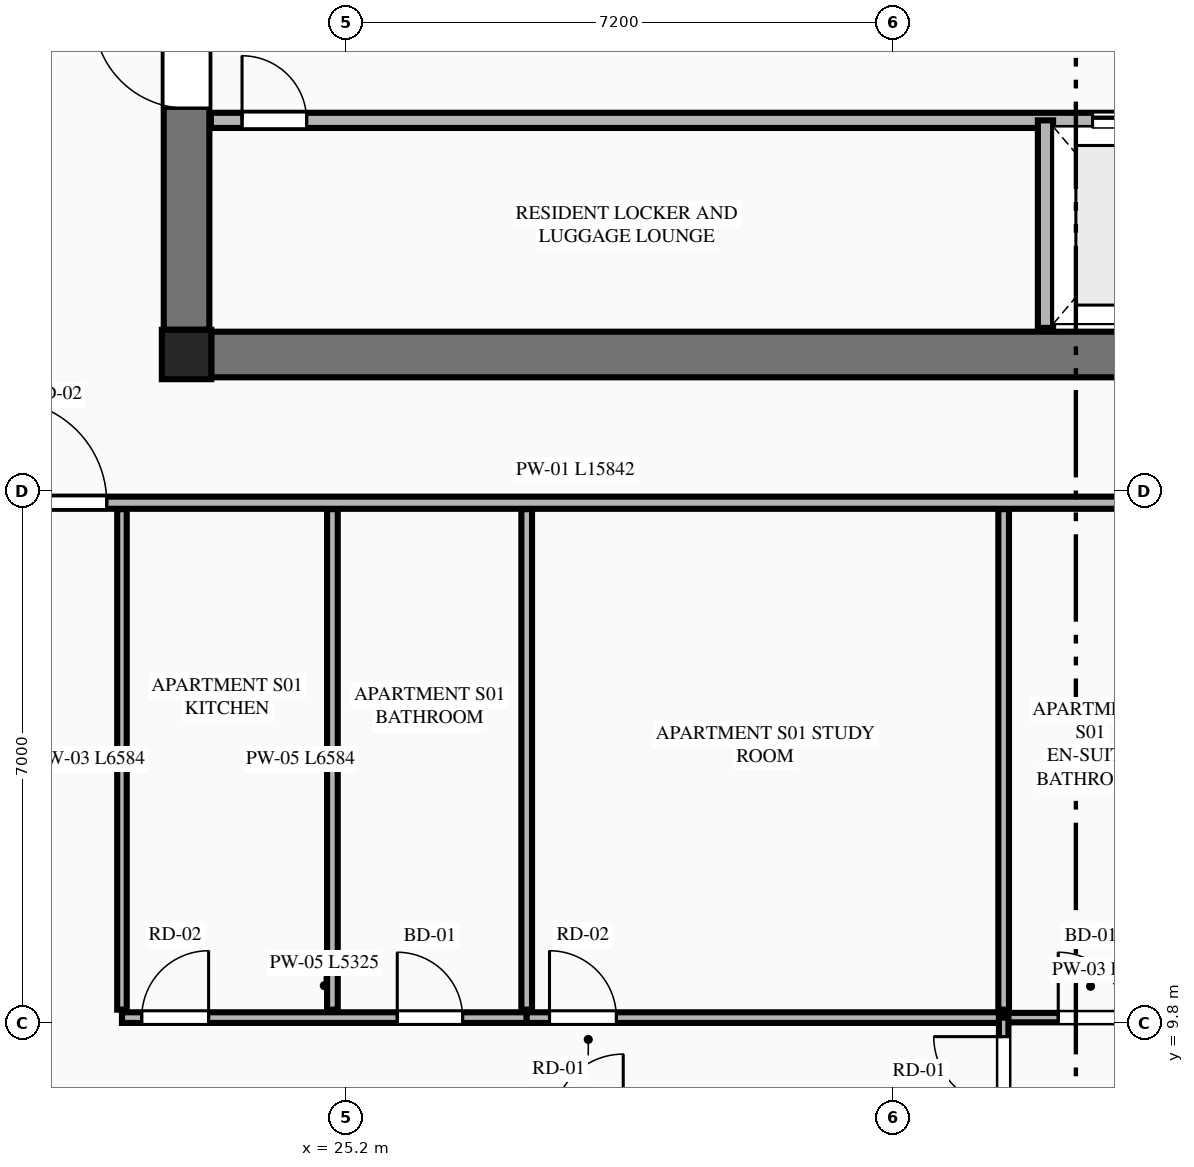
"""IFC4 building model, lengths in metres.
Left out: names, types, materials, properties, quantities, classifications, styles, units other than length and angle.
Written with IfcOpenShell. Run it as: python <this file> out.ifc"""

import sys

from ifc_helpers import new_model, si_unit, direction, frame, frame_2d, origin, origin_2d, place, context, subcontext, project, spatial, rectangle, extrude, element, fill, save


model = new_model("IFC4")
c1 = context("Model", 3, precision=1e-05, world=origin(), true_north=direction((0.0, 1.0)))
c2 = subcontext(c1, "Body", "Model", "MODEL_VIEW")
j1 = project(units=[si_unit("LENGTHUNIT", "METRE"), si_unit("PLANEANGLEUNIT", "RADIAN")], contexts=[c1])
p1 = place(None, origin())
s1 = spatial("IfcSite", under=j1, at=p1, CompositionType="ELEMENT")
p2 = place(p1, origin())
s2 = spatial("IfcBuilding", under=s1, at=p2, CompositionType="ELEMENT")
p3 = place(p2, frame((0.0, 0.0, 157.05)))
s3 = spatial("IfcBuildingStorey", under=s2, at=p3, CompositionType="ELEMENT", Elevation=157.05)
p4 = place(p3, frame((23.1, 18.6, 0.0), z_axis=(0.0, 0.0, 1.0), x_axis=(1.0, 0.0, 0.0)))
e1 = element("IfcColumn", 1, at=p4, inside=s3, PredefinedType="COLUMN", context=c2, shape_type="SweptSolid", body=[
    extrude(rectangle(XDim=0.65, YDim=0.65, at=origin_2d()), origin(), (0.0, 0.0, 1.0), 3.55),
])
p5 = place(p3, frame((23.425, 18.6, 0.0), z_axis=(0.0, 0.0, 1.0), x_axis=(1.0, 0.0, 0.0)))
e2 = element("IfcWall", 2, at=p5, inside=s3, PredefinedType="SHEAR", context=c2, shape_type="SweptSolid", body=[
    extrude(rectangle(XDim=17.95, YDim=0.6, at=frame_2d((8.975, 0.0))), origin(), (0.0, 0.0, 1.0), 3.34),
])
p6 = place(p3, frame((23.1, 18.925, 0.0), z_axis=(0.0, 0.0, 1.0), x_axis=(0.0, 1.0, 0.0)))
e3 = element("IfcWall", 3, at=p6, inside=s3, PredefinedType="SHEAR", context=c2, shape_type="SweptSolid", body=[
    extrude(rectangle(XDim=13.95, YDim=0.6, at=frame_2d((6.975, 0.0))), origin(), (0.0, 0.0, 1.0), 3.34),
])
p7 = place(p6, frame((2.915, 0.0, 0.0)))
e4 = element("IfcOpeningElement", 4, at=p7, cuts=e3, PredefinedType="OPENING", context=c2, shape_type="SweptSolid", body=[
    extrude(rectangle(XDim=1.22, YDim=2.25, at=frame_2d((0.61, 1.125))), frame((0.0, 0.31, 0.0), z_axis=(0.0, -1.0, 0.0), x_axis=(1.0, 0.0, 0.0)), (0.0, 0.0, 1.0), 0.62),
])
p8 = place(p3, frame((23.42, 21.68, 0.0), z_axis=(0.0, 0.0, 1.0), x_axis=(1.0, 0.0, 0.0)))
e5 = element("IfcWall", 5, at=p8, inside=s3, PredefinedType="PLUMBINGWALL", context=c2, shape_type="SweptSolid", body=[
    extrude(rectangle(XDim=17.96, YDim=0.2, at=frame_2d((8.98, 0.0))), origin(), (0.0, 0.0, 1.0), 3.34),
])
p9 = place(p8, frame((11.6, 0.0, 0.0)))
e6 = element("IfcOpeningElement", 6, at=p9, cuts=e5, PredefinedType="OPENING", context=c2, shape_type="SweptSolid", body=[
    extrude(rectangle(XDim=1.1, YDim=2.2, at=frame_2d((0.55, 1.1))), frame((0.0, 0.11, 0.0), z_axis=(0.0, -1.0, 0.0), x_axis=(1.0, 0.0, 0.0)), (0.0, 0.0, 1.0), 0.22),
])
p10 = place(p8, frame((0.41, 0.0, 0.0)))
e7 = element("IfcOpeningElement", 7, at=p10, cuts=e5, PredefinedType="OPENING", context=c2, shape_type="SweptSolid", body=[
    extrude(rectangle(XDim=0.85, YDim=2.05, at=frame_2d((0.425, 1.025))), frame((0.0, 0.11, 0.0), z_axis=(0.0, -1.0, 0.0), x_axis=(1.0, 0.0, 0.0)), (0.0, 0.0, 1.0), 0.22),
])
p11 = place(p8, frame((13.78, 0.0, 0.0)))
e8 = element("IfcOpeningElement", 8, at=p11, cuts=e5, PredefinedType="OPENING", context=c2, shape_type="SweptSolid", body=[
    extrude(rectangle(XDim=0.85, YDim=2.05, at=frame_2d((0.425, 1.025))), frame((0.0, 0.11, 0.0), z_axis=(0.0, -1.0, 0.0), x_axis=(1.0, 0.0, 0.0)), (0.0, 0.0, 1.0), 0.22),
])
p12 = place(p8, frame((16.13, 0.0, 0.0)))
e9 = element("IfcOpeningElement", 9, at=p12, cuts=e5, PredefinedType="OPENING", context=c2, shape_type="SweptSolid", body=[
    extrude(rectangle(XDim=0.85, YDim=2.05, at=frame_2d((0.425, 1.025))), frame((0.0, 0.11, 0.0), z_axis=(0.0, -1.0, 0.0), x_axis=(1.0, 0.0, 0.0)), (0.0, 0.0, 1.0), 0.22),
])
p13 = place(p3, frame((34.4, 18.95, 0.0), z_axis=(0.0, 0.0, 1.0), x_axis=(0.0, 1.0, 0.0)))
e10 = element("IfcWall", 10, at=p13, inside=s3, PredefinedType="PLUMBINGWALL", context=c2, shape_type="SweptSolid", body=[
    extrude(rectangle(XDim=2.73, YDim=0.2, at=frame_2d((1.365, 0.0))), origin(), (0.0, 0.0, 1.0), 3.34),
])
p14 = place(p3, frame((20.295, 16.65, 0.0), z_axis=(0.0, 0.0, 1.0), x_axis=(1.0, 0.0, 0.0)))
e11 = element("IfcWall", 11, at=p14, inside=s3, PredefinedType="PARTITIONING", context=c2, shape_type="SweptSolid", body=[
    extrude(rectangle(XDim=15.842, YDim=0.16, at=frame_2d((7.921, 0.0))), origin(), (0.0, 0.0, 1.0), 3.34),
])
p15 = place(p14, frame((0.405, 0.0, 0.0)))
e12 = element("IfcOpeningElement", 12, at=p15, cuts=e11, PredefinedType="OPENING", context=c2, shape_type="SweptSolid", body=[
    extrude(rectangle(XDim=1.35, YDim=2.35, at=frame_2d((0.675, 1.175))), frame((0.0, 0.09, 0.0), z_axis=(0.0, -1.0, 0.0), x_axis=(1.0, 0.0, 0.0)), (0.0, 0.0, 1.0), 0.18),
])
p16 = place(p3, frame((22.25, 9.981, 0.0), z_axis=(0.0, 0.0, 1.0), x_axis=(0.0, 1.0, 0.0)))
e13 = element("IfcWall", 13, at=p16, inside=s3, PredefinedType="PARTITIONING", context=c2, shape_type="SweptSolid", body=[
    extrude(rectangle(XDim=6.584, YDim=0.125, at=frame_2d((3.292, 0.0))), origin(), (0.0, 0.0, 1.0), 2.722),
])
p17 = place(p3, frame((22.25, 9.876, 0.0), z_axis=(0.0, 0.0, 1.0), x_axis=(1.0, 0.0, 0.0)))
e14 = element("IfcWall", 14, at=p17, inside=s3, PredefinedType="PLUMBINGWALL", context=c2, shape_type="SweptSolid", body=[
    extrude(rectangle(XDim=5.325, YDim=0.14, at=frame_2d((2.663, 0.0))), origin(), (0.0, 0.0, 1.0), 3.34),
])
p18 = place(p17, frame((3.622, 0.0, 0.0)))
e15 = element("IfcOpeningElement", 15, at=p18, cuts=e14, PredefinedType="OPENING", context=c2, shape_type="SweptSolid", body=[
    extrude(rectangle(XDim=0.86, YDim=2.1, at=frame_2d((0.43, 1.05))), frame((0.0, 0.08, 0.0), z_axis=(0.0, -1.0, 0.0), x_axis=(1.0, 0.0, 0.0)), (0.0, 0.0, 1.0), 0.16),
])
p19 = place(p17, frame((0.26, 0.0, 0.0)))
e16 = element("IfcOpeningElement", 16, at=p19, cuts=e14, PredefinedType="OPENING", context=c2, shape_type="SweptSolid", body=[
    extrude(rectangle(XDim=0.88, YDim=2.15, at=frame_2d((0.44, 1.075))), frame((0.0, 0.08, 0.0), z_axis=(0.0, -1.0, 0.0), x_axis=(1.0, 0.0, 0.0)), (0.0, 0.0, 1.0), 0.16),
])
p20 = place(p3, frame((27.575, 9.876, 0.0), z_axis=(0.0, 0.0, 1.0), x_axis=(1.0, 0.0, 0.0)))
e17 = element("IfcWall", 17, at=p20, inside=s3, PredefinedType="PLUMBINGWALL", context=c2, shape_type="SweptSolid", body=[
    extrude(rectangle(XDim=6.275, YDim=0.14, at=frame_2d((3.138, 0.0))), origin(), (0.0, 0.0, 1.0), 3.34),
])
p21 = place(p20, frame((0.3, 0.0, 0.0)))
e18 = element("IfcOpeningElement", 18, at=p21, cuts=e17, PredefinedType="OPENING", context=c2, shape_type="SweptSolid", body=[
    extrude(rectangle(XDim=0.88, YDim=2.15, at=frame_2d((0.44, 1.075))), frame((0.0, 0.08, 0.0), z_axis=(0.0, -1.0, 0.0), x_axis=(1.0, 0.0, 0.0)), (0.0, 0.0, 1.0), 0.16),
])
p22 = place(p3, frame((33.85, 9.876, 0.0), z_axis=(0.0, 0.0, 1.0), x_axis=(1.0, 0.0, 0.0)))
e19 = element("IfcWall", 19, at=p22, inside=s3, PredefinedType="PARTITIONING", context=c2, shape_type="SweptSolid", body=[
    extrude(rectangle(XDim=2.287, YDim=0.125, at=frame_2d((1.144, 0.0))), origin(), (0.0, 0.0, 1.0), 3.34),
])
p23 = place(p22, frame((0.718, 0.0, 0.0)))
e20 = element("IfcOpeningElement", 20, at=p23, cuts=e19, PredefinedType="OPENING", context=c2, shape_type="SweptSolid", body=[
    extrude(rectangle(XDim=0.86, YDim=2.1, at=frame_2d((0.43, 1.05))), frame((0.0, 0.073, 0.0), z_axis=(0.0, -1.0, 0.0), x_axis=(1.0, 0.0, 0.0)), (0.0, 0.0, 1.0), 0.145),
])
p24 = place(p3, frame((25.019, 9.981, 0.0), z_axis=(0.0, 0.0, 1.0), x_axis=(0.0, 1.0, 0.0)))
e21 = element("IfcWall", 21, at=p24, inside=s3, PredefinedType="PLUMBINGWALL", context=c2, shape_type="SweptSolid", body=[
    extrude(rectangle(XDim=6.584, YDim=0.14, at=frame_2d((3.292, 0.0))), origin(), (0.0, 0.0, 1.0), 3.34),
])
p25 = place(p3, frame((33.85, 8.546, 0.0), z_axis=(0.0, 0.0, 1.0), x_axis=(0.0, 1.0, 0.0)))
e22 = element("IfcWall", 22, at=p25, inside=s3, PredefinedType="PARTITIONING", context=c2, shape_type="SweptSolid", body=[
    extrude(rectangle(XDim=1.33, YDim=0.125, at=frame_2d((0.665, 0.0))), origin(), (0.0, 0.0, 1.0), 3.34),
])
p26 = place(p25, frame((0.16, 0.0, 0.0)))
e23 = element("IfcOpeningElement", 23, at=p26, cuts=e22, PredefinedType="OPENING", context=c2, shape_type="SweptSolid", body=[
    extrude(rectangle(XDim=0.92, YDim=2.15, at=frame_2d((0.46, 1.075))), frame((0.0, 0.073, 0.0), z_axis=(0.0, -1.0, 0.0), x_axis=(1.0, 0.0, 0.0)), (0.0, 0.0, 1.0), 0.145),
])
for number, where, z_axis, x_axis in (
    (24, (27.575, 9.981, 0.0), (0.0, 0.0, 1.0), (0.0, 1.0, 0.0)),
    (25, (33.85, 9.981, 0.0), (0.0, 0.0, 1.0), (0.0, 1.0, 0.0)),
):
    element("IfcWall", number, at=place(p3, frame(where, z_axis=z_axis, x_axis=x_axis)), inside=s3, PredefinedType="PLUMBINGWALL", context=c2, shape_type="SweptSolid", body=[
        extrude(rectangle(XDim=6.584, YDim=0.14, at=frame_2d((3.292, 0.0))), origin(), (0.0, 0.0, 1.0), 3.34),
    ])
p27 = place(p7, origin())
e26 = element("IfcDoor", 26, at=p27, inside=s3, OperationType="SINGLE_SWING_RIGHT", PredefinedType="DOOR", context=c2, shape_type="SweptSolid", body=[
    extrude(rectangle(XDim=1.22, YDim=2.25, at=frame_2d((0.61, 1.125))), frame((0.0, 0.025, 0.0), z_axis=(0.0, -1.0, 0.0), x_axis=(1.0, 0.0, 0.0)), (0.0, 0.0, 1.0), 0.05),
])
fill(e4, e26)
p28 = place(p9, origin())
e27 = element("IfcDoor", 27, at=p28, inside=s3, OperationType="DOUBLE_DOOR_SLIDING", PredefinedType="DOOR", context=c2, shape_type="SweptSolid", body=[
    extrude(rectangle(XDim=1.1, YDim=2.2, at=frame_2d((0.55, 1.1))), frame((0.0, 0.025, 0.0), z_axis=(0.0, -1.0, 0.0), x_axis=(1.0, 0.0, 0.0)), (0.0, 0.0, 1.0), 0.05),
])
fill(e6, e27)
p29 = place(p10, origin())
e28 = element("IfcDoor", 28, at=p29, inside=s3, OperationType="SINGLE_SWING_LEFT", PredefinedType="DOOR", context=c2, shape_type="SweptSolid", body=[
    extrude(rectangle(XDim=0.85, YDim=2.05, at=frame_2d((0.425, 1.025))), frame((0.0, 0.025, 0.0), z_axis=(0.0, -1.0, 0.0), x_axis=(1.0, 0.0, 0.0)), (0.0, 0.0, 1.0), 0.05),
])
fill(e7, e28)
p30 = place(p18, origin())
e29 = element("IfcDoor", 29, at=p30, inside=s3, OperationType="SINGLE_SWING_LEFT", PredefinedType="DOOR", context=c2, shape_type="SweptSolid", body=[
    extrude(rectangle(XDim=0.86, YDim=2.1, at=frame_2d((0.43, 1.05))), frame((0.0, 0.025, 0.0), z_axis=(0.0, -1.0, 0.0), x_axis=(1.0, 0.0, 0.0)), (0.0, 0.0, 1.0), 0.05),
])
fill(e15, e29)
p31 = place(p23, origin())
e30 = element("IfcDoor", 30, at=p31, inside=s3, OperationType="SINGLE_SWING_LEFT", PredefinedType="DOOR", context=c2, shape_type="SweptSolid", body=[
    extrude(rectangle(XDim=0.86, YDim=2.1, at=frame_2d((0.43, 1.05))), frame((0.0, 0.025, 0.0), z_axis=(0.0, -1.0, 0.0), x_axis=(1.0, 0.0, 0.0)), (0.0, 0.0, 1.0), 0.05),
])
fill(e20, e30)
p32 = place(p15, origin())
e31 = element("IfcDoor", 31, at=p32, inside=s3, OperationType="SINGLE_SWING_LEFT", PredefinedType="DOOR", context=c2, shape_type="SweptSolid", body=[
    extrude(rectangle(XDim=1.35, YDim=2.35, at=frame_2d((0.675, 1.175))), frame((0.0, 0.025, 0.0), z_axis=(0.0, -1.0, 0.0), x_axis=(1.0, 0.0, 0.0)), (0.0, 0.0, 1.0), 0.05),
])
fill(e12, e31)
p33 = place(p19, origin())
e32 = element("IfcDoor", 32, at=p33, inside=s3, OperationType="SINGLE_SWING_RIGHT", PredefinedType="DOOR", context=c2, shape_type="SweptSolid", body=[
    extrude(rectangle(XDim=0.88, YDim=2.15, at=frame_2d((0.44, 1.075))), frame((0.0, 0.025, 0.0), z_axis=(0.0, -1.0, 0.0), x_axis=(1.0, 0.0, 0.0)), (0.0, 0.0, 1.0), 0.05),
])
fill(e16, e32)
p34 = place(p21, origin())
e33 = element("IfcDoor", 33, at=p34, inside=s3, OperationType="SINGLE_SWING_LEFT", PredefinedType="DOOR", context=c2, shape_type="SweptSolid", body=[
    extrude(rectangle(XDim=0.88, YDim=2.15, at=frame_2d((0.44, 1.075))), frame((0.0, 0.025, 0.0), z_axis=(0.0, -1.0, 0.0), x_axis=(1.0, 0.0, 0.0)), (0.0, 0.0, 1.0), 0.05),
])
fill(e18, e33)
p35 = place(p26, origin())
e34 = element("IfcDoor", 34, at=p35, inside=s3, OperationType="SINGLE_SWING_RIGHT", PredefinedType="DOOR", context=c2, shape_type="SweptSolid", body=[
    extrude(rectangle(XDim=0.92, YDim=2.15, at=frame_2d((0.46, 1.075))), frame((0.0, 0.025, 0.0), z_axis=(0.0, -1.0, 0.0), x_axis=(1.0, 0.0, 0.0)), (0.0, 0.0, 1.0), 0.05),
])
fill(e23, e34)
save(model, sys.argv[1])
